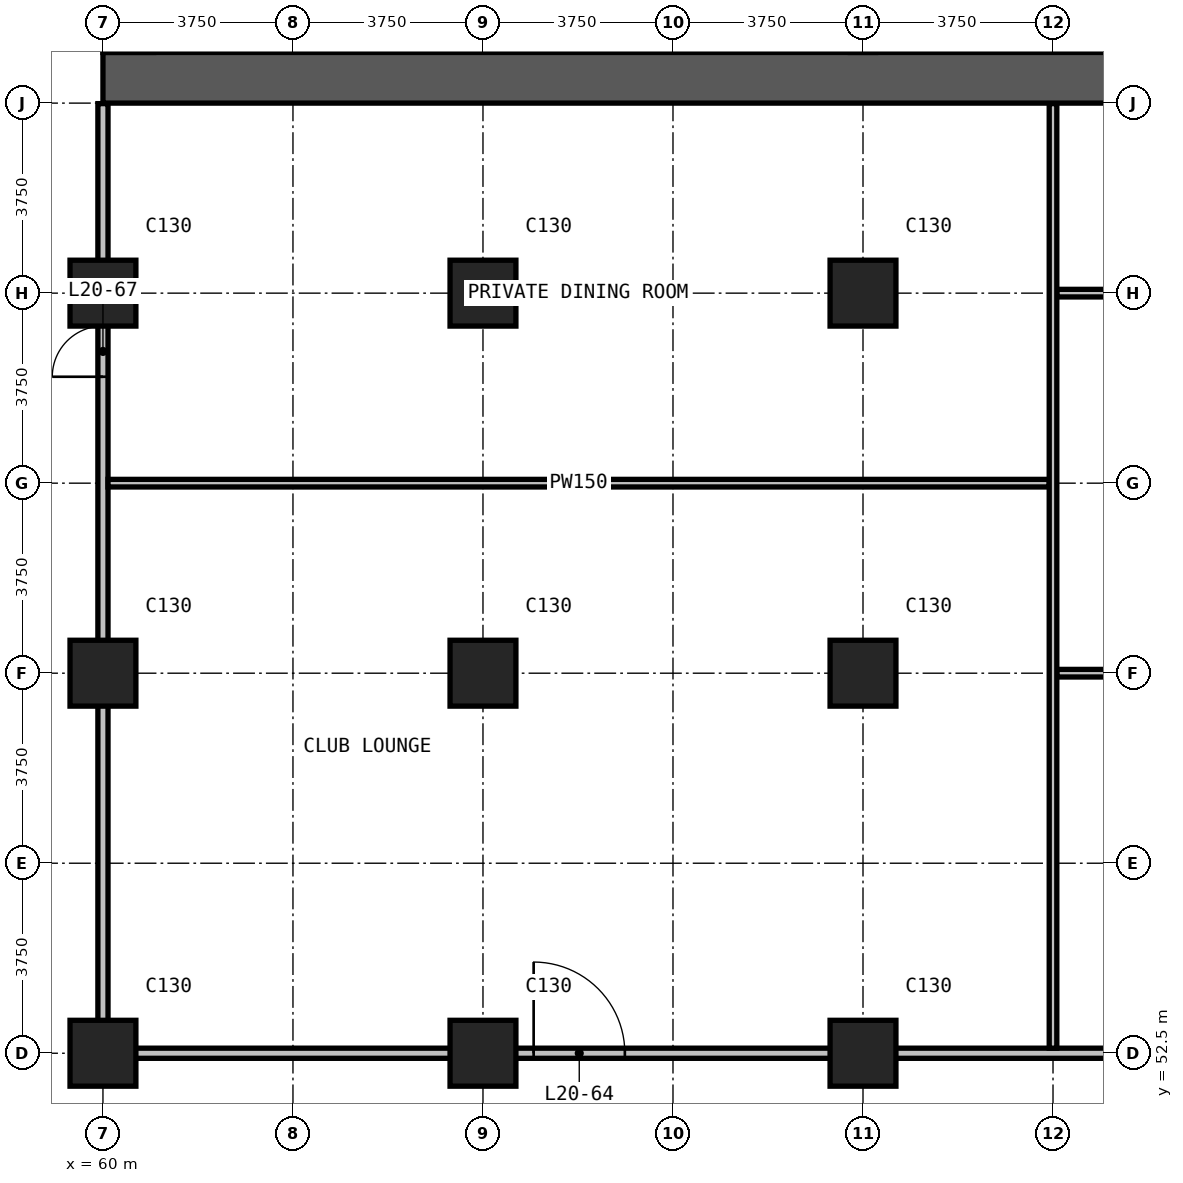
"""IFC4 building model, lengths in metres.
Left out: names, types, materials, properties, quantities, classifications, styles, units other than length and angle.
Written with IfcOpenShell. Run it as: python <this file> out.ifc"""

import sys

from ifc_helpers import new_model, si_unit, direction, frame, frame_2d, origin, origin_2d, place, context, subcontext, project, spatial, rectangle, extrude, element, fill, save


model = new_model("IFC4")
c1 = context("Model", 3, precision=1e-05, world=origin(), true_north=direction((0.0, 1.0)))
c2 = subcontext(c1, "Body", "Model", "MODEL_VIEW")
j1 = project(units=[si_unit("LENGTHUNIT", "METRE"), si_unit("PLANEANGLEUNIT", "RADIAN")], contexts=[c1])
p1 = place(None, origin())
s1 = spatial("IfcSite", under=j1, at=p1, CompositionType="ELEMENT")
p2 = place(p1, origin())
s2 = spatial("IfcBuilding", under=s1, at=p2, CompositionType="ELEMENT")
p3 = place(p2, frame((0.0, 0.0, 85.7)))
s3 = spatial("IfcBuildingStorey", under=s2, at=p3, CompositionType="ELEMENT", Elevation=85.7)
for number, where, z_axis, x_axis in (
    (1, (60.0, 52.5, 0.0), (0.0, 0.0, 1.0), (1.0, 0.0, 0.0)),
    (2, (60.0, 60.0, 0.0), (0.0, 0.0, 1.0), (1.0, 0.0, 0.0)),
    (3, (60.0, 67.5, 0.0), (0.0, 0.0, 1.0), (1.0, 0.0, 0.0)),
    (4, (67.5, 52.5, 0.0), (0.0, 0.0, 1.0), (1.0, 0.0, 0.0)),
    (5, (67.5, 60.0, 0.0), (0.0, 0.0, 1.0), (1.0, 0.0, 0.0)),
    (6, (67.5, 67.5, 0.0), (0.0, 0.0, 1.0), (1.0, 0.0, 0.0)),
    (7, (75.0, 52.5, 0.0), (0.0, 0.0, 1.0), (1.0, 0.0, 0.0)),
    (8, (75.0, 60.0, 0.0), (0.0, 0.0, 1.0), (1.0, 0.0, 0.0)),
    (9, (75.0, 67.5, 0.0), (0.0, 0.0, 1.0), (1.0, 0.0, 0.0)),
):
    element("IfcColumn", number, at=place(p3, frame(where, z_axis=z_axis, x_axis=x_axis)), inside=s3, PredefinedType="COLUMN", context=c2, shape_type="SweptSolid", body=[
        extrude(rectangle(XDim=1.3, YDim=1.3, at=origin_2d()), origin(), (0.0, 0.0, 1.0), 3.3),
    ])
p4 = place(p3, frame((60.0, 71.75, 0.0), z_axis=(0.0, 0.0, 1.0), x_axis=(1.0, 0.0, 0.0)))
e10 = element("IfcWall", 10, at=p4, inside=s3, PredefinedType="SHEAR", context=c2, shape_type="SweptSolid", body=[
    extrude(rectangle(XDim=30.0, YDim=1.0, at=frame_2d((15.0, 0.0))), origin(), (0.0, 0.0, 1.0), 3.3),
])
p5 = place(p3, frame((60.1, 52.5, 0.0), z_axis=(0.0, 0.0, 1.0), x_axis=(1.0, 0.0, 0.0)))
e11 = element("IfcWall", 11, at=p5, inside=s3, PredefinedType="PARTITIONING", context=c2, shape_type="SweptSolid", body=[
    extrude(rectangle(XDim=29.8, YDim=0.2, at=frame_2d((14.9, 0.0))), origin(), (0.0, 0.0, 1.0), 3.0),
])
p6 = place(p5, frame((8.4, 0.0, 0.0)))
e12 = element("IfcOpeningElement", 12, at=p6, cuts=e11, PredefinedType="OPENING", context=c2, shape_type="SweptSolid", body=[
    extrude(rectangle(XDim=1.8, YDim=2.2, at=frame_2d((0.9, 1.1))), frame((0.0, 0.11, 0.0), z_axis=(0.0, -1.0, 0.0), x_axis=(1.0, 0.0, 0.0)), (0.0, 0.0, 1.0), 0.22),
])
p7 = place(p5, frame((23.75, 0.0, 0.0)))
e13 = element("IfcOpeningElement", 13, at=p7, cuts=e11, PredefinedType="OPENING", context=c2, shape_type="SweptSolid", body=[
    extrude(rectangle(XDim=0.9, YDim=2.2, at=frame_2d((0.45, 1.1))), frame((0.0, 0.11, 0.0), z_axis=(0.0, -1.0, 0.0), x_axis=(1.0, 0.0, 0.0)), (0.0, 0.0, 1.0), 0.22),
])
p8 = place(p3, frame((60.0, 52.4, 0.0), z_axis=(0.0, 0.0, 1.0), x_axis=(0.0, 1.0, 0.0)))
e14 = element("IfcWall", 14, at=p8, inside=s3, PredefinedType="PARTITIONING", context=c2, shape_type="SweptSolid", body=[
    extrude(rectangle(XDim=18.84, YDim=0.2, at=frame_2d((9.42, 0.0))), origin(), (0.0, 0.0, 1.0), 3.0),
])
p9 = place(p8, frame((13.45, 0.0, 0.0)))
e15 = element("IfcOpeningElement", 15, at=p9, cuts=e14, PredefinedType="OPENING", context=c2, shape_type="SweptSolid", body=[
    extrude(rectangle(XDim=1.0, YDim=2.2, at=frame_2d((0.5, 1.1))), frame((0.0, 0.11, 0.0), z_axis=(0.0, -1.0, 0.0), x_axis=(1.0, 0.0, 0.0)), (0.0, 0.0, 1.0), 0.22),
])
p10 = place(p3, frame((78.825, 60.0, 0.0), z_axis=(0.0, 0.0, 1.0), x_axis=(1.0, 0.0, 0.0)))
e16 = element("IfcWall", 16, at=p10, inside=s3, PredefinedType="PARTITIONING", context=c2, shape_type="SweptSolid", body=[
    extrude(rectangle(XDim=11.075, YDim=0.15, at=frame_2d((5.538, 0.0))), origin(), (0.0, 0.0, 1.0), 3.0),
])
p11 = place(p3, frame((60.1, 63.75, 0.0), z_axis=(0.0, 0.0, 1.0), x_axis=(1.0, 0.0, 0.0)))
e17 = element("IfcWall", 17, at=p11, inside=s3, PredefinedType="PARTITIONING", context=c2, shape_type="SweptSolid", body=[
    extrude(rectangle(XDim=18.575, YDim=0.15, at=frame_2d((9.288, 0.0))), origin(), (0.0, 0.0, 1.0), 3.0),
])
p12 = place(p3, frame((78.825, 67.5, 0.0), z_axis=(0.0, 0.0, 1.0), x_axis=(1.0, 0.0, 0.0)))
e18 = element("IfcWall", 18, at=p12, inside=s3, PredefinedType="PARTITIONING", context=c2, shape_type="SweptSolid", body=[
    extrude(rectangle(XDim=11.075, YDim=0.15, at=frame_2d((5.538, 0.0))), origin(), (0.0, 0.0, 1.0), 3.0),
])
p13 = place(p3, frame((78.75, 52.6, 0.0), z_axis=(0.0, 0.0, 1.0), x_axis=(0.0, 1.0, 0.0)))
e19 = element("IfcWall", 19, at=p13, inside=s3, PredefinedType="PARTITIONING", context=c2, shape_type="SweptSolid", body=[
    extrude(rectangle(XDim=18.64, YDim=0.15, at=frame_2d((9.32, 0.0))), origin(), (0.0, 0.0, 1.0), 3.0),
])
p14 = place(p6, origin())
e20 = element("IfcDoor", 20, at=p14, inside=s3, OperationType="DOUBLE_DOOR_SINGLE_SWING", PredefinedType="DOOR", context=c2, shape_type="SweptSolid", body=[
    extrude(rectangle(XDim=1.8, YDim=2.2, at=frame_2d((0.9, 1.1))), frame((0.0, 0.025, 0.0), z_axis=(0.0, -1.0, 0.0), x_axis=(1.0, 0.0, 0.0)), (0.0, 0.0, 1.0), 0.05),
])
fill(e12, e20)
p15 = place(p9, origin())
e21 = element("IfcDoor", 21, at=p15, inside=s3, OperationType="SINGLE_SWING_LEFT", PredefinedType="DOOR", context=c2, shape_type="SweptSolid", body=[
    extrude(rectangle(XDim=1.0, YDim=2.2, at=frame_2d((0.5, 1.1))), frame((0.0, 0.025, 0.0), z_axis=(0.0, -1.0, 0.0), x_axis=(1.0, 0.0, 0.0)), (0.0, 0.0, 1.0), 0.05),
])
fill(e15, e21)
save(model, sys.argv[1])
